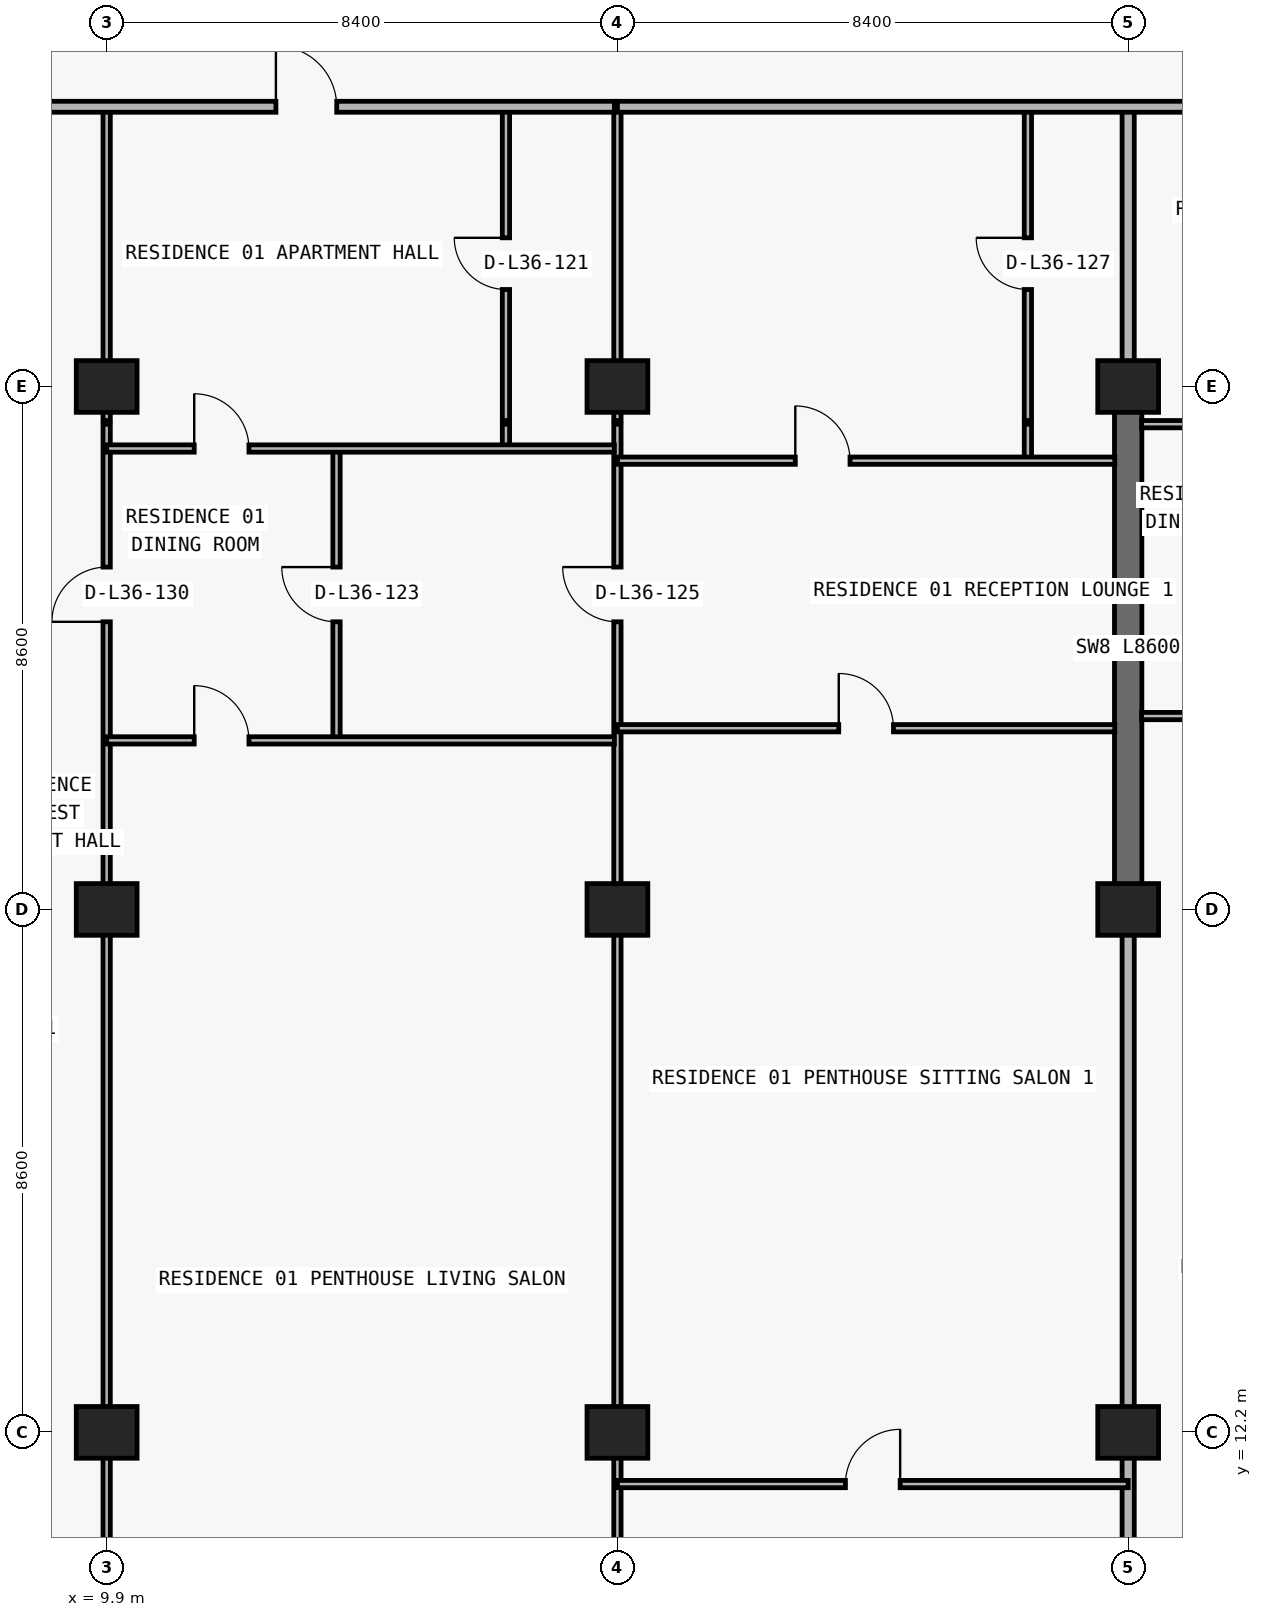
"""IFC4 building model, lengths in metres.
Left out: names, types, materials, properties, quantities, classifications, styles, units other than length and angle.
Written with IfcOpenShell. Run it as: python <this file> out.ifc"""

import sys

from ifc_helpers import new_model, si_unit, direction, frame, frame_2d, origin, origin_2d, place, context, subcontext, project, spatial, rectangle, extrude, element, fill, save


model = new_model("IFC4")
c1 = context("Model", 3, precision=1e-05, world=origin(), true_north=direction((0.0, 1.0)))
c2 = subcontext(c1, "Body", "Model", "MODEL_VIEW")
j1 = project(units=[si_unit("LENGTHUNIT", "METRE"), si_unit("PLANEANGLEUNIT", "RADIAN")], contexts=[c1])
p1 = place(None, origin())
s1 = spatial("IfcSite", under=j1, at=p1, CompositionType="ELEMENT")
p2 = place(p1, origin())
s2 = spatial("IfcBuilding", under=s1, at=p2, CompositionType="ELEMENT")
p3 = place(p2, frame((0.0, 0.0, 132.3)))
s3 = spatial("IfcBuildingStorey", under=s2, at=p3, CompositionType="ELEMENT", Elevation=132.3)
for number, where, z_axis, x_axis in (
    (1, (9.9, 12.2, 0.0), (0.0, 0.0, 1.0), (1.0, 0.0, 0.0)),
    (2, (18.3, 12.2, 0.0), (0.0, 0.0, 1.0), (1.0, 0.0, 0.0)),
    (3, (26.7, 12.2, 0.0), (0.0, 0.0, 1.0), (1.0, 0.0, 0.0)),
    (4, (9.9, 20.8, 0.0), (0.0, 0.0, 1.0), (1.0, 0.0, 0.0)),
    (5, (18.3, 20.8, 0.0), (0.0, 0.0, 1.0), (1.0, 0.0, 0.0)),
    (6, (26.7, 20.8, 0.0), (0.0, 0.0, 1.0), (1.0, 0.0, 0.0)),
    (7, (9.9, 29.4, 0.0), (0.0, 0.0, 1.0), (1.0, 0.0, 0.0)),
    (8, (18.3, 29.4, 0.0), (0.0, 0.0, 1.0), (1.0, 0.0, 0.0)),
    (9, (26.7, 29.4, 0.0), (0.0, 0.0, 1.0), (1.0, 0.0, 0.0)),
):
    element("IfcColumn", number, at=place(p3, frame(where, z_axis=z_axis, x_axis=x_axis)), inside=s3, PredefinedType="COLUMN", context=c2, shape_type="SweptSolid", body=[
        extrude(rectangle(XDim=1.0, YDim=0.85, at=origin_2d()), origin(), (0.0, 0.0, 1.0), 3.05),
    ])
p4 = place(p3, frame((26.7, 20.8, 0.0), z_axis=(0.0, 0.0, 1.0), x_axis=(0.0, 1.0, 0.0)))
e10 = element("IfcWall", 10, at=p4, inside=s3, PredefinedType="SHEAR", context=c2, shape_type="SweptSolid", body=[
    extrude(rectangle(XDim=8.6, YDim=0.45, at=frame_2d((4.3, 0.0))), origin(), (0.0, 0.0, 1.0), 3.05),
])
p5 = place(p3, frame((9.9, 8.84, 0.0), z_axis=(0.0, 0.0, 1.0), x_axis=(0.0, 1.0, 0.0)))
e11 = element("IfcWall", 11, at=p5, inside=s3, PredefinedType="PARTITIONING", context=c2, shape_type="SweptSolid", body=[
    extrude(rectangle(XDim=19.94, YDim=0.12, at=frame_2d((9.97, 0.0))), origin(), (0.0, 0.0, 1.0), 2.174),
])
p6 = place(p5, frame((16.69, 0.0, 0.0)))
e12 = element("IfcOpeningElement", 12, at=p6, cuts=e11, PredefinedType="OPENING", context=c2, shape_type="SweptSolid", body=[
    extrude(rectangle(XDim=0.9, YDim=2.124, at=frame_2d((0.45, 1.062))), frame((0.0, 0.07, 0.0), z_axis=(0.0, -1.0, 0.0), x_axis=(1.0, 0.0, 0.0)), (0.0, 0.0, 1.0), 0.14),
])
p7 = place(p3, frame((9.9, 28.84, 0.0), z_axis=(0.0, 0.0, 1.0), x_axis=(0.0, 1.0, 0.0)))
e13 = element("IfcWall", 13, at=p7, inside=s3, PredefinedType="PARTITIONING", context=c2, shape_type="SweptSolid", body=[
    extrude(rectangle(XDim=5.16, YDim=0.12, at=frame_2d((2.58, 0.0))), origin(), (0.0, 0.0, 1.0), 2.174),
])
p8 = place(p3, frame((13.68, 23.58, 0.0), z_axis=(0.0, 0.0, 1.0), x_axis=(0.0, 1.0, 0.0)))
e14 = element("IfcWall", 14, at=p8, inside=s3, PredefinedType="PARTITIONING", context=c2, shape_type="SweptSolid", body=[
    extrude(rectangle(XDim=4.8, YDim=0.12, at=frame_2d((2.4, 0.0))), origin(), (0.0, 0.0, 1.0), 3.05),
])
p9 = place(p8, frame((1.95, 0.0, 0.0)))
e15 = element("IfcOpeningElement", 15, at=p9, cuts=e14, PredefinedType="OPENING", context=c2, shape_type="SweptSolid", body=[
    extrude(rectangle(XDim=0.9, YDim=2.15, at=frame_2d((0.45, 1.075))), frame((0.0, 0.07, 0.0), z_axis=(0.0, -1.0, 0.0), x_axis=(1.0, 0.0, 0.0)), (0.0, 0.0, 1.0), 0.14),
])
p10 = place(p3, frame((16.467, 28.38, 0.0), z_axis=(0.0, 0.0, 1.0), x_axis=(0.0, 1.0, 0.0)))
e16 = element("IfcWall", 16, at=p10, inside=s3, PredefinedType="PARTITIONING", context=c2, shape_type="SweptSolid", body=[
    extrude(rectangle(XDim=0.4, YDim=0.12, at=frame_2d((0.2, 0.0))), origin(), (0.0, 0.0, 1.0), 3.05),
])
p11 = place(p3, frame((16.467, 28.84, 0.0), z_axis=(0.0, 0.0, 1.0), x_axis=(0.0, 1.0, 0.0)))
e17 = element("IfcWall", 17, at=p11, inside=s3, PredefinedType="PARTITIONING", context=c2, shape_type="SweptSolid", body=[
    extrude(rectangle(XDim=5.16, YDim=0.12, at=frame_2d((2.58, 0.0))), origin(), (0.0, 0.0, 1.0), 3.05),
])
p12 = place(p11, frame((2.155, 0.0, 0.0)))
e18 = element("IfcOpeningElement", 18, at=p12, cuts=e17, PredefinedType="OPENING", context=c2, shape_type="SweptSolid", body=[
    extrude(rectangle(XDim=0.85, YDim=2.1, at=frame_2d((0.425, 1.05))), frame((0.0, 0.07, 0.0), z_axis=(0.0, -1.0, 0.0), x_axis=(1.0, 0.0, 0.0)), (0.0, 0.0, 1.0), 0.14),
])
p13 = place(p3, frame((18.3, 8.84, 0.0), z_axis=(0.0, 0.0, 1.0), x_axis=(0.0, 1.0, 0.0)))
e19 = element("IfcWall", 19, at=p13, inside=s3, PredefinedType="PARTITIONING", context=c2, shape_type="SweptSolid", body=[
    extrude(rectangle(XDim=19.94, YDim=0.12, at=frame_2d((9.97, 0.0))), origin(), (0.0, 0.0, 1.0), 2.174),
])
p14 = place(p13, frame((16.69, 0.0, 0.0)))
e20 = element("IfcOpeningElement", 20, at=p14, cuts=e19, PredefinedType="OPENING", context=c2, shape_type="SweptSolid", body=[
    extrude(rectangle(XDim=0.9, YDim=2.124, at=frame_2d((0.45, 1.062))), frame((0.0, 0.07, 0.0), z_axis=(0.0, -1.0, 0.0), x_axis=(1.0, 0.0, 0.0)), (0.0, 0.0, 1.0), 0.14),
])
p15 = place(p3, frame((18.3, 28.84, 0.0), z_axis=(0.0, 0.0, 1.0), x_axis=(0.0, 1.0, 0.0)))
e21 = element("IfcWall", 21, at=p15, inside=s3, PredefinedType="PARTITIONING", context=c2, shape_type="SweptSolid", body=[
    extrude(rectangle(XDim=5.16, YDim=0.12, at=frame_2d((2.58, 0.0))), origin(), (0.0, 0.0, 1.0), 2.174),
])
p16 = place(p3, frame((25.051, 28.18, 0.0), z_axis=(0.0, 0.0, 1.0), x_axis=(0.0, 1.0, 0.0)))
e22 = element("IfcWall", 22, at=p16, inside=s3, PredefinedType="PARTITIONING", context=c2, shape_type="SweptSolid", body=[
    extrude(rectangle(XDim=0.6, YDim=0.12, at=frame_2d((0.3, 0.0))), origin(), (0.0, 0.0, 1.0), 3.05),
])
p17 = place(p3, frame((25.051, 28.84, 0.0), z_axis=(0.0, 0.0, 1.0), x_axis=(0.0, 1.0, 0.0)))
e23 = element("IfcWall", 23, at=p17, inside=s3, PredefinedType="PARTITIONING", context=c2, shape_type="SweptSolid", body=[
    extrude(rectangle(XDim=5.16, YDim=0.12, at=frame_2d((2.58, 0.0))), origin(), (0.0, 0.0, 1.0), 3.05),
])
p18 = place(p17, frame((2.155, 0.0, 0.0)))
e24 = element("IfcOpeningElement", 24, at=p18, cuts=e23, PredefinedType="OPENING", context=c2, shape_type="SweptSolid", body=[
    extrude(rectangle(XDim=0.85, YDim=2.1, at=frame_2d((0.425, 1.05))), frame((0.0, 0.07, 0.0), z_axis=(0.0, -1.0, 0.0), x_axis=(1.0, 0.0, 0.0)), (0.0, 0.0, 1.0), 0.14),
])
p19 = place(p3, frame((26.7, 8.84, 0.0), z_axis=(0.0, 0.0, 1.0), x_axis=(0.0, 1.0, 0.0)))
e25 = element("IfcWall", 25, at=p19, inside=s3, PredefinedType="PARTITIONING", context=c2, shape_type="SweptSolid", body=[
    extrude(rectangle(XDim=11.955, YDim=0.2, at=frame_2d((5.978, 0.0))), origin(), (0.0, 0.0, 1.0), 2.174),
])
p20 = place(p3, frame((26.7, 29.405, 0.0), z_axis=(0.0, 0.0, 1.0), x_axis=(0.0, 1.0, 0.0)))
e26 = element("IfcWall", 26, at=p20, inside=s3, PredefinedType="PARTITIONING", context=c2, shape_type="SweptSolid", body=[
    extrude(rectangle(XDim=4.595, YDim=0.2, at=frame_2d((2.297, 0.0))), origin(), (0.0, 0.0, 1.0), 2.335),
])
p21 = place(p3, frame((18.3, 11.35, 0.0), z_axis=(0.0, 0.0, 1.0), x_axis=(1.0, 0.0, 0.0)))
e27 = element("IfcWall", 27, at=p21, inside=s3, PredefinedType="PARTITIONING", context=c2, shape_type="SweptSolid", body=[
    extrude(rectangle(XDim=8.4, YDim=0.12, at=frame_2d((4.2, 0.0))), origin(), (0.0, 0.0, 1.0), 3.05),
])
p22 = place(p21, frame((3.75, 0.0, 0.0)))
e28 = element("IfcOpeningElement", 28, at=p22, cuts=e27, PredefinedType="OPENING", context=c2, shape_type="SweptSolid", body=[
    extrude(rectangle(XDim=0.9, YDim=2.15, at=frame_2d((0.45, 1.075))), frame((0.0, 0.07, 0.0), z_axis=(0.0, -1.0, 0.0), x_axis=(1.0, 0.0, 0.0)), (0.0, 0.0, 1.0), 0.14),
])
p23 = place(p3, frame((9.9, 23.58, 0.0), z_axis=(0.0, 0.0, 1.0), x_axis=(1.0, 0.0, 0.0)))
e29 = element("IfcWall", 29, at=p23, inside=s3, PredefinedType="PARTITIONING", context=c2, shape_type="SweptSolid", body=[
    extrude(rectangle(XDim=8.35, YDim=0.12, at=frame_2d((4.175, 0.0))), origin(), (0.0, 0.0, 1.0), 3.05),
])
p24 = place(p23, frame((1.44, 0.0, 0.0)))
e30 = element("IfcOpeningElement", 30, at=p24, cuts=e29, PredefinedType="OPENING", context=c2, shape_type="SweptSolid", body=[
    extrude(rectangle(XDim=0.9, YDim=2.15, at=frame_2d((0.45, 1.075))), frame((0.0, 0.07, 0.0), z_axis=(0.0, -1.0, 0.0), x_axis=(1.0, 0.0, 0.0)), (0.0, 0.0, 1.0), 0.14),
])
p25 = place(p3, frame((18.3, 23.78, 0.0), z_axis=(0.0, 0.0, 1.0), x_axis=(1.0, 0.0, 0.0)))
e31 = element("IfcWall", 31, at=p25, inside=s3, PredefinedType="PARTITIONING", context=c2, shape_type="SweptSolid", body=[
    extrude(rectangle(XDim=8.18, YDim=0.12, at=frame_2d((4.09, 0.0))), origin(), (0.0, 0.0, 1.0), 3.05),
])
p26 = place(p25, frame((3.64, 0.0, 0.0)))
e32 = element("IfcOpeningElement", 32, at=p26, cuts=e31, PredefinedType="OPENING", context=c2, shape_type="SweptSolid", body=[
    extrude(rectangle(XDim=0.9, YDim=2.15, at=frame_2d((0.45, 1.075))), frame((0.0, 0.07, 0.0), z_axis=(0.0, -1.0, 0.0), x_axis=(1.0, 0.0, 0.0)), (0.0, 0.0, 1.0), 0.14),
])
p27 = place(p3, frame((26.92, 23.98, 0.0), z_axis=(0.0, 0.0, 1.0), x_axis=(1.0, 0.0, 0.0)))
e33 = element("IfcWall", 33, at=p27, inside=s3, PredefinedType="PARTITIONING", context=c2, shape_type="SweptSolid", body=[
    extrude(rectangle(XDim=8.18, YDim=0.12, at=frame_2d((4.09, 0.0))), origin(), (0.0, 0.0, 1.0), 3.05),
])
p28 = place(p27, frame((1.204, 0.0, 0.0)))
e34 = element("IfcOpeningElement", 34, at=p28, cuts=e33, PredefinedType="OPENING", context=c2, shape_type="SweptSolid", body=[
    extrude(rectangle(XDim=0.9, YDim=2.15, at=frame_2d((0.45, 1.075))), frame((0.0, 0.07, 0.0), z_axis=(0.0, -1.0, 0.0), x_axis=(1.0, 0.0, 0.0)), (0.0, 0.0, 1.0), 0.14),
])
p29 = place(p3, frame((18.3, 28.18, 0.0), z_axis=(0.0, 0.0, 1.0), x_axis=(1.0, 0.0, 0.0)))
e35 = element("IfcWall", 35, at=p29, inside=s3, PredefinedType="PARTITIONING", context=c2, shape_type="SweptSolid", body=[
    extrude(rectangle(XDim=8.18, YDim=0.12, at=frame_2d((4.09, 0.0))), origin(), (0.0, 0.0, 1.0), 3.05),
])
p30 = place(p29, frame((2.926, 0.0, 0.0)))
e36 = element("IfcOpeningElement", 36, at=p30, cuts=e35, PredefinedType="OPENING", context=c2, shape_type="SweptSolid", body=[
    extrude(rectangle(XDim=0.9, YDim=2.15, at=frame_2d((0.45, 1.075))), frame((0.0, 0.07, 0.0), z_axis=(0.0, -1.0, 0.0), x_axis=(1.0, 0.0, 0.0)), (0.0, 0.0, 1.0), 0.14),
])
p31 = place(p3, frame((9.9, 28.38, 0.0), z_axis=(0.0, 0.0, 1.0), x_axis=(1.0, 0.0, 0.0)))
e37 = element("IfcWall", 37, at=p31, inside=s3, PredefinedType="PARTITIONING", context=c2, shape_type="SweptSolid", body=[
    extrude(rectangle(XDim=8.35, YDim=0.12, at=frame_2d((4.175, 0.0))), origin(), (0.0, 0.0, 1.0), 3.05),
])
p32 = place(p31, frame((1.44, 0.0, 0.0)))
e38 = element("IfcOpeningElement", 38, at=p32, cuts=e37, PredefinedType="OPENING", context=c2, shape_type="SweptSolid", body=[
    extrude(rectangle(XDim=0.9, YDim=2.15, at=frame_2d((0.45, 1.075))), frame((0.0, 0.07, 0.0), z_axis=(0.0, -1.0, 0.0), x_axis=(1.0, 0.0, 0.0)), (0.0, 0.0, 1.0), 0.14),
])
p33 = place(p3, frame((26.92, 28.78, 0.0), z_axis=(0.0, 0.0, 1.0), x_axis=(1.0, 0.0, 0.0)))
e39 = element("IfcWall", 39, at=p33, inside=s3, PredefinedType="PARTITIONING", context=c2, shape_type="SweptSolid", body=[
    extrude(rectangle(XDim=8.18, YDim=0.12, at=frame_2d((4.09, 0.0))), origin(), (0.0, 0.0, 1.0), 3.05),
])
p34 = place(p33, frame((1.204, 0.0, 0.0)))
e40 = element("IfcOpeningElement", 40, at=p34, cuts=e39, PredefinedType="OPENING", context=c2, shape_type="SweptSolid", body=[
    extrude(rectangle(XDim=0.9, YDim=2.15, at=frame_2d((0.45, 1.075))), frame((0.0, 0.07, 0.0), z_axis=(0.0, -1.0, 0.0), x_axis=(1.0, 0.0, 0.0)), (0.0, 0.0, 1.0), 0.14),
])
p35 = place(p3, frame((7.705, 34.0, 0.0), z_axis=(0.0, 0.0, 1.0), x_axis=(1.0, 0.0, 0.0)))
e41 = element("IfcWall", 41, at=p35, inside=s3, PredefinedType="PARTITIONING", context=c2, shape_type="SweptSolid", body=[
    extrude(rectangle(XDim=10.545, YDim=0.18, at=frame_2d((5.272, 0.0))), origin(), (0.0, 0.0, 1.0), 3.05),
])
p36 = place(p35, frame((4.979, 0.0, 0.0)))
e42 = element("IfcOpeningElement", 42, at=p36, cuts=e41, PredefinedType="OPENING", context=c2, shape_type="SweptSolid", body=[
    extrude(rectangle(XDim=1.0, YDim=2.2, at=frame_2d((0.5, 1.1))), frame((0.0, 0.1, 0.0), z_axis=(0.0, -1.0, 0.0), x_axis=(1.0, 0.0, 0.0)), (0.0, 0.0, 1.0), 0.2),
])
p37 = place(p3, frame((18.3, 34.0, 0.0), z_axis=(0.0, 0.0, 1.0), x_axis=(1.0, 0.0, 0.0)))
e43 = element("IfcWall", 43, at=p37, inside=s3, PredefinedType="PARTITIONING", context=c2, shape_type="SweptSolid", body=[
    extrude(rectangle(XDim=37.586, YDim=0.18, at=frame_2d((18.793, 0.0))), origin(), (0.0, 0.0, 1.0), 3.05),
])
p38 = place(p37, frame((11.162, 0.0, 0.0)))
e44 = element("IfcOpeningElement", 44, at=p38, cuts=e43, PredefinedType="OPENING", context=c2, shape_type="SweptSolid", body=[
    extrude(rectangle(XDim=1.0, YDim=2.2, at=frame_2d((0.5, 1.1))), frame((0.0, 0.1, 0.0), z_axis=(0.0, -1.0, 0.0), x_axis=(1.0, 0.0, 0.0)), (0.0, 0.0, 1.0), 0.2),
])
p39 = place(p37, frame((34.693, 0.0, 0.0)))
e45 = element("IfcOpeningElement", 45, at=p39, cuts=e43, PredefinedType="OPENING", context=c2, shape_type="SweptSolid", body=[
    extrude(rectangle(XDim=1.0, YDim=2.2, at=frame_2d((0.5, 1.1))), frame((0.0, 0.1, 0.0), z_axis=(0.0, -1.0, 0.0), x_axis=(1.0, 0.0, 0.0)), (0.0, 0.0, 1.0), 0.2),
])
p40 = place(p36, origin())
e46 = element("IfcDoor", 46, at=p40, inside=s3, OperationType="SINGLE_SWING_LEFT", PredefinedType="DOOR", context=c2, shape_type="SweptSolid", body=[
    extrude(rectangle(XDim=1.0, YDim=2.2, at=frame_2d((0.5, 1.1))), frame((0.0, 0.025, 0.0), z_axis=(0.0, -1.0, 0.0), x_axis=(1.0, 0.0, 0.0)), (0.0, 0.0, 1.0), 0.05),
])
fill(e42, e46)
p41 = place(p12, origin())
e47 = element("IfcDoor", 47, at=p41, inside=s3, OperationType="SINGLE_SWING_RIGHT", PredefinedType="DOOR", context=c2, shape_type="SweptSolid", body=[
    extrude(rectangle(XDim=0.85, YDim=2.1, at=frame_2d((0.425, 1.05))), frame((0.0, 0.025, 0.0), z_axis=(0.0, -1.0, 0.0), x_axis=(1.0, 0.0, 0.0)), (0.0, 0.0, 1.0), 0.05),
])
fill(e18, e47)
p42 = place(p32, origin())
e48 = element("IfcDoor", 48, at=p42, inside=s3, OperationType="SINGLE_SWING_LEFT", PredefinedType="DOOR", context=c2, shape_type="SweptSolid", body=[
    extrude(rectangle(XDim=0.9, YDim=2.15, at=frame_2d((0.45, 1.075))), frame((0.0, 0.025, 0.0), z_axis=(0.0, -1.0, 0.0), x_axis=(1.0, 0.0, 0.0)), (0.0, 0.0, 1.0), 0.05),
])
fill(e38, e48)
p43 = place(p9, origin())
e49 = element("IfcDoor", 49, at=p43, inside=s3, OperationType="SINGLE_SWING_RIGHT", PredefinedType="DOOR", context=c2, shape_type="SweptSolid", body=[
    extrude(rectangle(XDim=0.9, YDim=2.15, at=frame_2d((0.45, 1.075))), frame((0.0, 0.025, 0.0), z_axis=(0.0, -1.0, 0.0), x_axis=(1.0, 0.0, 0.0)), (0.0, 0.0, 1.0), 0.05),
])
fill(e15, e49)
p44 = place(p24, origin())
e50 = element("IfcDoor", 50, at=p44, inside=s3, OperationType="SINGLE_SWING_LEFT", PredefinedType="DOOR", context=c2, shape_type="SweptSolid", body=[
    extrude(rectangle(XDim=0.9, YDim=2.15, at=frame_2d((0.45, 1.075))), frame((0.0, 0.025, 0.0), z_axis=(0.0, -1.0, 0.0), x_axis=(1.0, 0.0, 0.0)), (0.0, 0.0, 1.0), 0.05),
])
fill(e30, e50)
p45 = place(p14, origin())
e51 = element("IfcDoor", 51, at=p45, inside=s3, OperationType="SINGLE_SWING_RIGHT", PredefinedType="DOOR", context=c2, shape_type="SweptSolid", body=[
    extrude(rectangle(XDim=0.9, YDim=2.124, at=frame_2d((0.45, 1.062))), frame((0.0, 0.025, 0.0), z_axis=(0.0, -1.0, 0.0), x_axis=(1.0, 0.0, 0.0)), (0.0, 0.0, 1.0), 0.05),
])
fill(e20, e51)
p46 = place(p30, origin())
e52 = element("IfcDoor", 52, at=p46, inside=s3, OperationType="SINGLE_SWING_LEFT", PredefinedType="DOOR", context=c2, shape_type="SweptSolid", body=[
    extrude(rectangle(XDim=0.9, YDim=2.15, at=frame_2d((0.45, 1.075))), frame((0.0, 0.025, 0.0), z_axis=(0.0, -1.0, 0.0), x_axis=(1.0, 0.0, 0.0)), (0.0, 0.0, 1.0), 0.05),
])
fill(e36, e52)
p47 = place(p18, origin())
e53 = element("IfcDoor", 53, at=p47, inside=s3, OperationType="SINGLE_SWING_RIGHT", PredefinedType="DOOR", context=c2, shape_type="SweptSolid", body=[
    extrude(rectangle(XDim=0.85, YDim=2.1, at=frame_2d((0.425, 1.05))), frame((0.0, 0.025, 0.0), z_axis=(0.0, -1.0, 0.0), x_axis=(1.0, 0.0, 0.0)), (0.0, 0.0, 1.0), 0.05),
])
fill(e24, e53)
p48 = place(p26, origin())
e54 = element("IfcDoor", 54, at=p48, inside=s3, OperationType="SINGLE_SWING_LEFT", PredefinedType="DOOR", context=c2, shape_type="SweptSolid", body=[
    extrude(rectangle(XDim=0.9, YDim=2.15, at=frame_2d((0.45, 1.075))), frame((0.0, 0.025, 0.0), z_axis=(0.0, -1.0, 0.0), x_axis=(1.0, 0.0, 0.0)), (0.0, 0.0, 1.0), 0.05),
])
fill(e32, e54)
p49 = place(p22, origin())
e55 = element("IfcDoor", 55, at=p49, inside=s3, OperationType="SINGLE_SWING_RIGHT", PredefinedType="DOOR", context=c2, shape_type="SweptSolid", body=[
    extrude(rectangle(XDim=0.9, YDim=2.15, at=frame_2d((0.45, 1.075))), frame((0.0, 0.025, 0.0), z_axis=(0.0, -1.0, 0.0), x_axis=(1.0, 0.0, 0.0)), (0.0, 0.0, 1.0), 0.05),
])
fill(e28, e55)
p50 = place(p6, origin())
e56 = element("IfcDoor", 56, at=p50, inside=s3, OperationType="SINGLE_SWING_LEFT", PredefinedType="DOOR", context=c2, shape_type="SweptSolid", body=[
    extrude(rectangle(XDim=0.9, YDim=2.124, at=frame_2d((0.45, 1.062))), frame((0.0, 0.025, 0.0), z_axis=(0.0, -1.0, 0.0), x_axis=(1.0, 0.0, 0.0)), (0.0, 0.0, 1.0), 0.05),
])
fill(e12, e56)
save(model, sys.argv[1])
